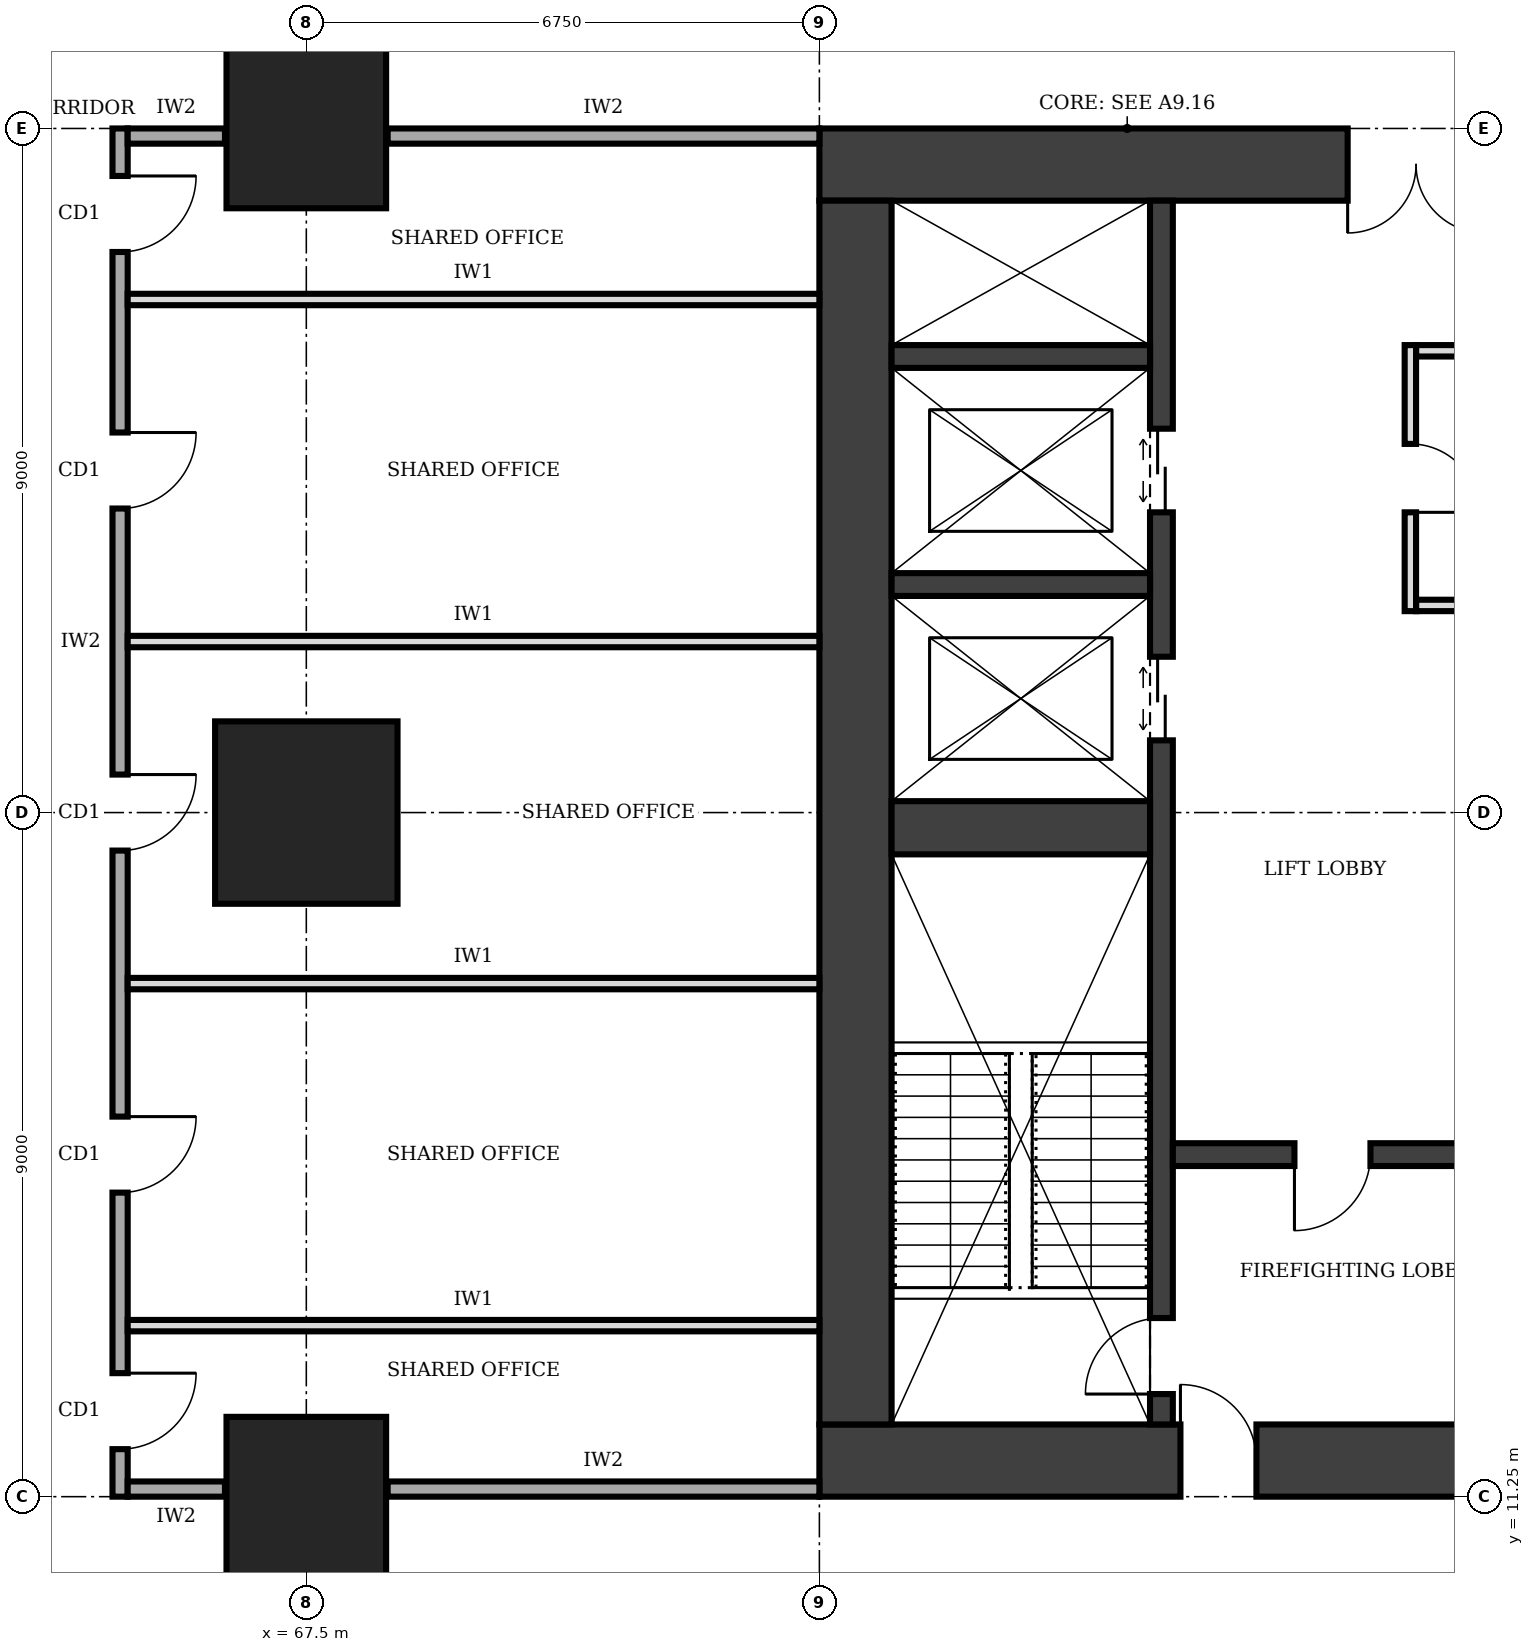
"""IFC4 building model, lengths in metres.
Left out: names, types, materials, properties, quantities, classifications, styles, units other than length and angle.
Written with IfcOpenShell. Run it as: python <this file> out.ifc"""

import sys

from ifc_helpers import new_model, si_unit, direction, frame, frame_2d, origin, origin_2d, place, context, subcontext, project, spatial, rectangle, extrude, element, fill, save


model = new_model("IFC4")
c1 = context("Model", 3, precision=1e-05, world=origin(), true_north=direction((0.0, 1.0)))
c2 = subcontext(c1, "Body", "Model", "MODEL_VIEW")
j1 = project(units=[si_unit("LENGTHUNIT", "METRE"), si_unit("PLANEANGLEUNIT", "RADIAN")], contexts=[c1])
p1 = place(None, origin())
s1 = spatial("IfcSite", under=j1, at=p1, CompositionType="ELEMENT")
p2 = place(p1, origin())
s2 = spatial("IfcBuilding", under=s1, at=p2, CompositionType="ELEMENT")
p3 = place(p2, frame((0.0, 0.0, 89.0)))
s3 = spatial("IfcBuildingStorey", under=s2, at=p3, CompositionType="ELEMENT", Elevation=89.0)
p4 = place(p3, frame((74.25, 11.725, 0.0), z_axis=(0.0, 0.0, 1.0), x_axis=(1.0, 0.0, 0.0)))
e1 = element("IfcWall", 1, at=p4, inside=s3, PredefinedType="SHEAR", context=c2, shape_type="SweptSolid", body=[
    extrude(rectangle(XDim=13.5, YDim=0.95, at=frame_2d((6.75, 0.0))), origin(), (0.0, 0.0, 1.0), 4.0),
])
p5 = place(p4, frame((4.75, 0.0, 0.0)))
e2 = element("IfcOpeningElement", 2, at=p5, cuts=e1, PredefinedType="OPENING", context=c2, shape_type="SweptSolid", body=[
    extrude(rectangle(XDim=1.0, YDim=2.1, at=frame_2d((0.5, 1.05))), frame((0.0, 0.485, 0.0), z_axis=(0.0, -1.0, 0.0), x_axis=(1.0, 0.0, 0.0)), (0.0, 0.0, 1.0), 0.97),
])
p6 = place(p3, frame((87.75, 28.775, 0.0), z_axis=(0.0, 0.0, 1.0), x_axis=(-1.0, 0.0, 0.0)))
e3 = element("IfcWall", 3, at=p6, inside=s3, PredefinedType="SHEAR", context=c2, shape_type="SweptSolid", body=[
    extrude(rectangle(XDim=13.5, YDim=0.95, at=frame_2d((6.75, 0.0))), origin(), (0.0, 0.0, 1.0), 4.0),
])
p7 = place(p6, frame((4.75, 0.0, 0.0)))
e4 = element("IfcOpeningElement", 4, at=p7, cuts=e3, PredefinedType="OPENING", context=c2, shape_type="SweptSolid", body=[
    extrude(rectangle(XDim=1.8, YDim=2.1, at=frame_2d((0.9, 1.05))), frame((0.0, 0.485, 0.0), z_axis=(0.0, -1.0, 0.0), x_axis=(1.0, 0.0, 0.0)), (0.0, 0.0, 1.0), 0.97),
])
p8 = place(p3, frame((74.725, 28.3, 0.0), z_axis=(0.0, 0.0, 1.0), x_axis=(0.0, -1.0, 0.0)))
e5 = element("IfcWall", 5, at=p8, inside=s3, PredefinedType="SHEAR", context=c2, shape_type="SweptSolid", body=[
    extrude(rectangle(XDim=16.1, YDim=0.95, at=frame_2d((8.05, 0.0))), origin(), (0.0, 0.0, 1.0), 4.0),
])
p9 = place(p3, frame((78.75, 12.2, 0.0), z_axis=(0.0, 0.0, 1.0), x_axis=(0.0, 1.0, 0.0)))
e6 = element("IfcWall", 6, at=p9, inside=s3, PredefinedType="SHEAR", context=c2, shape_type="SweptSolid", body=[
    extrude(rectangle(XDim=16.1, YDim=0.3, at=frame_2d((8.05, 0.0))), origin(), (0.0, 0.0, 1.0), 4.0),
])
p10 = place(p9, frame((0.4, 0.0, 0.0)))
e7 = element("IfcOpeningElement", 7, at=p10, cuts=e6, PredefinedType="OPENING", context=c2, shape_type="SweptSolid", body=[
    extrude(rectangle(XDim=1.0, YDim=2.1, at=frame_2d((0.5, 1.05))), frame((0.0, 0.16, 0.0), z_axis=(0.0, -1.0, 0.0), x_axis=(1.0, 0.0, 0.0)), (0.0, 0.0, 1.0), 0.32),
])
p11 = place(p9, frame((9.0, 0.0, 0.0)))
e8 = element("IfcOpeningElement", 8, at=p11, cuts=e6, PredefinedType="OPENING", context=c2, shape_type="SweptSolid", body=[
    extrude(rectangle(XDim=1.1, YDim=2.1, at=frame_2d((0.55, 1.05))), frame((0.0, 0.16, 0.0), z_axis=(0.0, -1.0, 0.0), x_axis=(1.0, 0.0, 0.0)), (0.0, 0.0, 1.0), 0.32),
])
p12 = place(p9, frame((12.0, 0.0, 0.0)))
e9 = element("IfcOpeningElement", 9, at=p12, cuts=e6, PredefinedType="OPENING", context=c2, shape_type="SweptSolid", body=[
    extrude(rectangle(XDim=1.1, YDim=2.1, at=frame_2d((0.55, 1.05))), frame((0.0, 0.16, 0.0), z_axis=(0.0, -1.0, 0.0), x_axis=(1.0, 0.0, 0.0)), (0.0, 0.0, 1.0), 0.32),
])
p13 = place(p3, frame((75.2, 20.05, 0.0), z_axis=(0.0, 0.0, 1.0), x_axis=(1.0, 0.0, 0.0)))
e10 = element("IfcWall", 10, at=p13, inside=s3, PredefinedType="SHEAR", context=c2, shape_type="SweptSolid", body=[
    extrude(rectangle(XDim=3.4, YDim=0.7, at=frame_2d((1.7, 0.0))), origin(), (0.0, 0.0, 1.0), 4.0),
])
p14 = place(p3, frame((78.9, 15.75, 0.0), z_axis=(0.0, 0.0, 1.0), x_axis=(1.0, 0.0, 0.0)))
e11 = element("IfcWall", 11, at=p14, inside=s3, PredefinedType="SHEAR", context=c2, shape_type="SweptSolid", body=[
    extrude(rectangle(XDim=4.2, YDim=0.3, at=frame_2d((2.1, 0.0))), origin(), (0.0, 0.0, 1.0), 4.0),
])
p15 = place(p14, frame((1.6, 0.0, 0.0)))
e12 = element("IfcOpeningElement", 12, at=p15, cuts=e11, PredefinedType="OPENING", context=c2, shape_type="SweptSolid", body=[
    extrude(rectangle(XDim=1.0, YDim=2.1, at=frame_2d((0.5, 1.05))), frame((0.0, 0.16, 0.0), z_axis=(0.0, -1.0, 0.0), x_axis=(1.0, 0.0, 0.0)), (0.0, 0.0, 1.0), 0.32),
])
for number, where, z_axis, x_axis in (
    (13, (75.2, 23.25, 0.0), (0.0, 0.0, 1.0), (1.0, 0.0, 0.0)),
    (14, (75.2, 26.25, 0.0), (0.0, 0.0, 1.0), (1.0, 0.0, 0.0)),
):
    element("IfcWall", number, at=place(p3, frame(where, z_axis=z_axis, x_axis=x_axis)), inside=s3, PredefinedType="SHEAR", context=c2, shape_type="SweptSolid", body=[
        extrude(rectangle(XDim=3.4, YDim=0.3, at=frame_2d((1.7, 0.0))), origin(), (0.0, 0.0, 1.0), 4.0),
    ])
p16 = place(p3, frame((67.5, 11.25, 0.0), z_axis=(0.0, 0.0, 1.0), x_axis=(1.0, 0.0, 0.0)))
e15 = element("IfcColumn", 15, at=p16, inside=s3, PredefinedType="COLUMN", context=c2, shape_type="SweptSolid", body=[
    extrude(rectangle(XDim=2.1, YDim=2.1, at=origin_2d()), origin(), (0.0, 0.0, 1.0), 4.0),
])
p17 = place(p3, frame((67.5, 20.25, 0.0), z_axis=(0.0, 0.0, 1.0), x_axis=(1.0, 0.0, 0.0)))
e16 = element("IfcColumn", 16, at=p17, inside=s3, PredefinedType="COLUMN", context=c2, shape_type="SweptSolid", body=[
    extrude(rectangle(XDim=2.4, YDim=2.4, at=origin_2d()), origin(), (0.0, 0.0, 1.0), 4.0),
])
p18 = place(p3, frame((67.5, 29.25, 0.0), z_axis=(0.0, 0.0, 1.0), x_axis=(1.0, 0.0, 0.0)))
e17 = element("IfcColumn", 17, at=p18, inside=s3, PredefinedType="COLUMN", context=c2, shape_type="SweptSolid", body=[
    extrude(rectangle(XDim=2.1, YDim=2.1, at=origin_2d()), origin(), (0.0, 0.0, 1.0), 4.0),
])
p19 = place(p3, frame((82.025, 22.9, 0.0), z_axis=(0.0, 0.0, 1.0), x_axis=(0.0, 1.0, 0.0)))
e18 = element("IfcWall", 18, at=p19, inside=s3, PredefinedType="PARTITIONING", context=c2, shape_type="SweptSolid", body=[
    extrude(rectangle(XDim=3.5, YDim=0.15, at=frame_2d((1.75, 0.0))), origin(), (0.0, 0.0, 1.0), 3.75),
])
p20 = place(p19, frame((1.3, 0.0, 0.0)))
e19 = element("IfcOpeningElement", 19, at=p20, cuts=e18, PredefinedType="OPENING", context=c2, shape_type="SweptSolid", body=[
    extrude(rectangle(XDim=0.9, YDim=2.1, at=frame_2d((0.45, 1.05))), frame((0.0, 0.085, 0.0), z_axis=(0.0, -1.0, 0.0), x_axis=(1.0, 0.0, 0.0)), (0.0, 0.0, 1.0), 0.17),
])
for number, where, z_axis, x_axis in (
    (20, (82.1, 22.975, 0.0), (0.0, 0.0, 1.0), (1.0, 0.0, 0.0)),
    (21, (82.1, 26.325, 0.0), (0.0, 0.0, 1.0), (1.0, 0.0, 0.0)),
):
    element("IfcWall", number, at=place(p3, frame(where, z_axis=z_axis, x_axis=x_axis)), inside=s3, PredefinedType="PARTITIONING", context=c2, shape_type="SweptSolid", body=[
        extrude(rectangle(XDim=1.0, YDim=0.15, at=frame_2d((0.5, 0.0))), origin(), (0.0, 0.0, 1.0), 3.75),
    ])
p21 = place(p3, frame((65.05, 29.25, 0.0), z_axis=(0.0, 0.0, 1.0), x_axis=(0.0, -1.0, 0.0)))
e22 = element("IfcWall", 22, at=p21, inside=s3, PredefinedType="SOLIDWALL", context=c2, shape_type="SweptSolid", body=[
    extrude(rectangle(XDim=18.0, YDim=0.2, at=frame_2d((9.0, 0.0))), origin(), (0.0, 0.0, 1.0), 3.75),
])
p22 = place(p21, frame((16.375, 0.0, 0.0)))
e23 = element("IfcOpeningElement", 23, at=p22, cuts=e22, PredefinedType="OPENING", context=c2, shape_type="SweptSolid", body=[
    extrude(rectangle(XDim=1.0, YDim=2.1, at=frame_2d((0.5, 1.05))), frame((0.0, 0.11, 0.0), z_axis=(0.0, -1.0, 0.0), x_axis=(1.0, 0.0, 0.0)), (0.0, 0.0, 1.0), 0.22),
])
p23 = place(p21, frame((13.0, 0.0, 0.0)))
e24 = element("IfcOpeningElement", 24, at=p23, cuts=e22, PredefinedType="OPENING", context=c2, shape_type="SweptSolid", body=[
    extrude(rectangle(XDim=1.0, YDim=2.1, at=frame_2d((0.5, 1.05))), frame((0.0, 0.11, 0.0), z_axis=(0.0, -1.0, 0.0), x_axis=(1.0, 0.0, 0.0)), (0.0, 0.0, 1.0), 0.22),
])
p24 = place(p21, frame((8.5, 0.0, 0.0)))
e25 = element("IfcOpeningElement", 25, at=p24, cuts=e22, PredefinedType="OPENING", context=c2, shape_type="SweptSolid", body=[
    extrude(rectangle(XDim=1.0, YDim=2.1, at=frame_2d((0.5, 1.05))), frame((0.0, 0.11, 0.0), z_axis=(0.0, -1.0, 0.0), x_axis=(1.0, 0.0, 0.0)), (0.0, 0.0, 1.0), 0.22),
])
p25 = place(p21, frame((4.0, 0.0, 0.0)))
e26 = element("IfcOpeningElement", 26, at=p25, cuts=e22, PredefinedType="OPENING", context=c2, shape_type="SweptSolid", body=[
    extrude(rectangle(XDim=1.0, YDim=2.1, at=frame_2d((0.5, 1.05))), frame((0.0, 0.11, 0.0), z_axis=(0.0, -1.0, 0.0), x_axis=(1.0, 0.0, 0.0)), (0.0, 0.0, 1.0), 0.22),
])
p26 = place(p21, frame((0.625, 0.0, 0.0)))
e27 = element("IfcOpeningElement", 27, at=p26, cuts=e22, PredefinedType="OPENING", context=c2, shape_type="SweptSolid", body=[
    extrude(rectangle(XDim=1.0, YDim=2.1, at=frame_2d((0.5, 1.05))), frame((0.0, 0.11, 0.0), z_axis=(0.0, -1.0, 0.0), x_axis=(1.0, 0.0, 0.0)), (0.0, 0.0, 1.0), 0.22),
])
p27 = place(p3, frame((65.15, 11.35, 0.0), z_axis=(0.0, 0.0, 1.0), x_axis=(1.0, 0.0, 0.0)))
e28 = element("IfcWall", 28, at=p27, inside=s3, PredefinedType="SOLIDWALL", context=c2, shape_type="SweptSolid", body=[
    extrude(rectangle(XDim=1.28, YDim=0.2, at=frame_2d((0.64, 0.0))), origin(), (0.0, 0.0, 1.0), 2.85),
])
p28 = place(p3, frame((68.57, 11.35, 0.0), z_axis=(0.0, 0.0, 1.0), x_axis=(1.0, 0.0, 0.0)))
e29 = element("IfcWall", 29, at=p28, inside=s3, PredefinedType="SOLIDWALL", context=c2, shape_type="SweptSolid", body=[
    extrude(rectangle(XDim=5.68, YDim=0.2, at=frame_2d((2.84, 0.0))), origin(), (0.0, 0.0, 1.0), 2.85),
])
p29 = place(p3, frame((65.15, 29.15, 0.0), z_axis=(0.0, 0.0, 1.0), x_axis=(1.0, 0.0, 0.0)))
e30 = element("IfcWall", 30, at=p29, inside=s3, PredefinedType="SOLIDWALL", context=c2, shape_type="SweptSolid", body=[
    extrude(rectangle(XDim=1.28, YDim=0.2, at=frame_2d((0.64, 0.0))), origin(), (0.0, 0.0, 1.0), 2.85),
])
p30 = place(p3, frame((68.57, 29.15, 0.0), z_axis=(0.0, 0.0, 1.0), x_axis=(1.0, 0.0, 0.0)))
e31 = element("IfcWall", 31, at=p30, inside=s3, PredefinedType="SOLIDWALL", context=c2, shape_type="SweptSolid", body=[
    extrude(rectangle(XDim=5.68, YDim=0.2, at=frame_2d((2.84, 0.0))), origin(), (0.0, 0.0, 1.0), 2.85),
])
for number, where, z_axis, x_axis in (
    (32, (65.15, 13.5, 0.0), (0.0, 0.0, 1.0), (1.0, 0.0, 0.0)),
    (33, (65.15, 18.0, 0.0), (0.0, 0.0, 1.0), (1.0, 0.0, 0.0)),
    (34, (65.15, 22.5, 0.0), (0.0, 0.0, 1.0), (1.0, 0.0, 0.0)),
    (35, (65.15, 27.0, 0.0), (0.0, 0.0, 1.0), (1.0, 0.0, 0.0)),
):
    element("IfcWall", number, at=place(p3, frame(where, z_axis=z_axis, x_axis=x_axis)), inside=s3, PredefinedType="PARTITIONING", context=c2, shape_type="SweptSolid", body=[
        extrude(rectangle(XDim=9.1, YDim=0.15, at=frame_2d((4.55, 0.0))), origin(), (0.0, 0.0, 1.0), 3.75),
    ])
p31 = place(p5, origin())
e36 = element("IfcDoor", 36, at=p31, inside=s3, OperationType="SINGLE_SWING_LEFT", PredefinedType="DOOR", context=c2, shape_type="SweptSolid", body=[
    extrude(rectangle(XDim=1.0, YDim=2.1, at=frame_2d((0.5, 1.05))), frame((0.0, 0.025, 0.0), z_axis=(0.0, -1.0, 0.0), x_axis=(1.0, 0.0, 0.0)), (0.0, 0.0, 1.0), 0.05),
])
fill(e2, e36)
p32 = place(p7, origin())
e37 = element("IfcDoor", 37, at=p32, inside=s3, OperationType="DOUBLE_DOOR_SINGLE_SWING", PredefinedType="DOOR", context=c2, shape_type="SweptSolid", body=[
    extrude(rectangle(XDim=1.8, YDim=2.1, at=frame_2d((0.9, 1.05))), frame((0.0, 0.025, 0.0), z_axis=(0.0, -1.0, 0.0), x_axis=(1.0, 0.0, 0.0)), (0.0, 0.0, 1.0), 0.05),
])
fill(e4, e37)
p33 = place(p15, frame((1.0, 0.0, 0.0), z_axis=(0.0, 0.0, 1.0), x_axis=(-1.0, 0.0, 0.0)))
e38 = element("IfcDoor", 38, at=p33, inside=s3, OperationType="SINGLE_SWING_RIGHT", PredefinedType="DOOR", context=c2, shape_type="SweptSolid", body=[
    extrude(rectangle(XDim=1.0, YDim=2.1, at=frame_2d((0.5, 1.05))), frame((0.0, 0.025, 0.0), z_axis=(0.0, -1.0, 0.0), x_axis=(1.0, 0.0, 0.0)), (0.0, 0.0, 1.0), 0.05),
])
fill(e12, e38)
p34 = place(p10, origin())
e39 = element("IfcDoor", 39, at=p34, inside=s3, OperationType="SINGLE_SWING_LEFT", PredefinedType="DOOR", context=c2, shape_type="SweptSolid", body=[
    extrude(rectangle(XDim=1.0, YDim=2.1, at=frame_2d((0.5, 1.05))), frame((0.0, 0.025, 0.0), z_axis=(0.0, -1.0, 0.0), x_axis=(1.0, 0.0, 0.0)), (0.0, 0.0, 1.0), 0.05),
])
fill(e7, e39)
p35 = place(p11, origin())
e40 = element("IfcDoor", 40, at=p35, inside=s3, OperationType="DOUBLE_DOOR_SLIDING", PredefinedType="DOOR", context=c2, shape_type="SweptSolid", body=[
    extrude(rectangle(XDim=1.1, YDim=2.1, at=frame_2d((0.55, 1.05))), frame((0.0, 0.025, 0.0), z_axis=(0.0, -1.0, 0.0), x_axis=(1.0, 0.0, 0.0)), (0.0, 0.0, 1.0), 0.05),
])
fill(e8, e40)
p36 = place(p12, origin())
e41 = element("IfcDoor", 41, at=p36, inside=s3, OperationType="DOUBLE_DOOR_SLIDING", PredefinedType="DOOR", context=c2, shape_type="SweptSolid", body=[
    extrude(rectangle(XDim=1.1, YDim=2.1, at=frame_2d((0.55, 1.05))), frame((0.0, 0.025, 0.0), z_axis=(0.0, -1.0, 0.0), x_axis=(1.0, 0.0, 0.0)), (0.0, 0.0, 1.0), 0.05),
])
fill(e9, e41)
p37 = place(p20, frame((0.9, 0.0, 0.0), z_axis=(0.0, 0.0, 1.0), x_axis=(-1.0, 0.0, 0.0)))
e42 = element("IfcDoor", 42, at=p37, inside=s3, OperationType="SINGLE_SWING_RIGHT", PredefinedType="DOOR", context=c2, shape_type="SweptSolid", body=[
    extrude(rectangle(XDim=0.9, YDim=2.1, at=frame_2d((0.45, 1.05))), frame((0.0, 0.025, 0.0), z_axis=(0.0, -1.0, 0.0), x_axis=(1.0, 0.0, 0.0)), (0.0, 0.0, 1.0), 0.05),
])
fill(e19, e42)
p38 = place(p22, origin())
e43 = element("IfcDoor", 43, at=p38, inside=s3, OperationType="SINGLE_SWING_LEFT", PredefinedType="DOOR", context=c2, shape_type="SweptSolid", body=[
    extrude(rectangle(XDim=1.0, YDim=2.1, at=frame_2d((0.5, 1.05))), frame((0.0, 0.025, 0.0), z_axis=(0.0, -1.0, 0.0), x_axis=(1.0, 0.0, 0.0)), (0.0, 0.0, 1.0), 0.05),
])
fill(e23, e43)
p39 = place(p23, origin())
e44 = element("IfcDoor", 44, at=p39, inside=s3, OperationType="SINGLE_SWING_LEFT", PredefinedType="DOOR", context=c2, shape_type="SweptSolid", body=[
    extrude(rectangle(XDim=1.0, YDim=2.1, at=frame_2d((0.5, 1.05))), frame((0.0, 0.025, 0.0), z_axis=(0.0, -1.0, 0.0), x_axis=(1.0, 0.0, 0.0)), (0.0, 0.0, 1.0), 0.05),
])
fill(e24, e44)
p40 = place(p24, origin())
e45 = element("IfcDoor", 45, at=p40, inside=s3, OperationType="SINGLE_SWING_LEFT", PredefinedType="DOOR", context=c2, shape_type="SweptSolid", body=[
    extrude(rectangle(XDim=1.0, YDim=2.1, at=frame_2d((0.5, 1.05))), frame((0.0, 0.025, 0.0), z_axis=(0.0, -1.0, 0.0), x_axis=(1.0, 0.0, 0.0)), (0.0, 0.0, 1.0), 0.05),
])
fill(e25, e45)
p41 = place(p25, origin())
e46 = element("IfcDoor", 46, at=p41, inside=s3, OperationType="SINGLE_SWING_LEFT", PredefinedType="DOOR", context=c2, shape_type="SweptSolid", body=[
    extrude(rectangle(XDim=1.0, YDim=2.1, at=frame_2d((0.5, 1.05))), frame((0.0, 0.025, 0.0), z_axis=(0.0, -1.0, 0.0), x_axis=(1.0, 0.0, 0.0)), (0.0, 0.0, 1.0), 0.05),
])
fill(e26, e46)
p42 = place(p26, origin())
e47 = element("IfcDoor", 47, at=p42, inside=s3, OperationType="SINGLE_SWING_LEFT", PredefinedType="DOOR", context=c2, shape_type="SweptSolid", body=[
    extrude(rectangle(XDim=1.0, YDim=2.1, at=frame_2d((0.5, 1.05))), frame((0.0, 0.025, 0.0), z_axis=(0.0, -1.0, 0.0), x_axis=(1.0, 0.0, 0.0)), (0.0, 0.0, 1.0), 0.05),
])
fill(e27, e47)
save(model, sys.argv[1])
